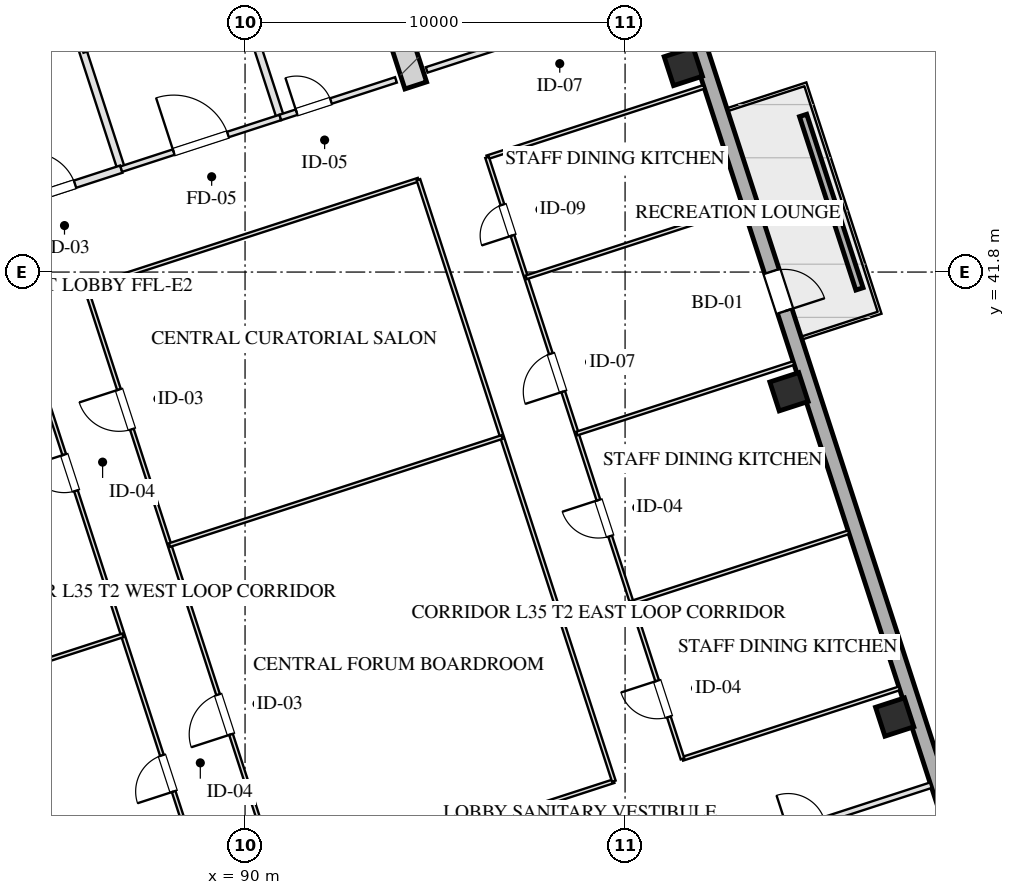
"""IFC4 building model, lengths in metres.
Left out: names, types, materials, properties, quantities, classifications, styles, units other than length and angle.
Written with IfcOpenShell. Run it as: python <this file> out.ifc"""

import sys

from ifc_helpers import new_model, si_unit, direction, frame, frame_2d, origin, origin_2d, place, context, subcontext, project, spatial, rectangle, hollow_rectangle, extrude, element, fill, save


model = new_model("IFC4")
c1 = context("Model", 3, precision=1e-05, world=origin(), true_north=direction((0.0, 1.0)))
c2 = subcontext(c1, "Body", "Model", "MODEL_VIEW")
j1 = project(units=[si_unit("LENGTHUNIT", "METRE"), si_unit("PLANEANGLEUNIT", "RADIAN")], contexts=[c1])
p1 = place(None, origin())
s1 = spatial("IfcSite", under=j1, at=p1, CompositionType="ELEMENT")
p2 = place(p1, origin())
s2 = spatial("IfcBuilding", under=s1, at=p2, CompositionType="ELEMENT")
p3 = place(p2, frame((0.0, 0.0, 134.55)))
s3 = spatial("IfcBuildingStorey", under=s2, at=p3, CompositionType="ELEMENT", Elevation=134.55)
p4 = place(p3, frame((94.492, 46.71, 0.0), z_axis=(0.0, 0.0, 1.0), x_axis=(-0.309010370028, 0.95105866865, 0.0)))
e1 = element("IfcWall", 1, at=p4, inside=s3, PredefinedType="SHEAR", context=c2, shape_type="SweptSolid", body=[
    extrude(rectangle(XDim=9.48, YDim=0.6, at=frame_2d((4.74, 0.0))), origin(), (0.0, 0.0, 1.0), 3.45),
])
for number, where, z_axis, x_axis in (
    (2, (107.094, 30.091, 0.0), (0.0, 0.0, 1.0), (0.951, 0.309, 0.0)),
    (3, (104.313, 38.651, 0.0), (0.0, 0.0, 1.0), (0.951, 0.309, 0.0)),
    (4, (101.532, 47.21, 0.0), (0.0, 0.0, 1.0), (0.951, 0.309, 0.0)),
):
    element("IfcColumn", number, at=place(p3, frame(where, z_axis=z_axis, x_axis=x_axis)), inside=s3, PredefinedType="COLUMN", context=c2, shape_type="SweptSolid", body=[
        extrude(hollow_rectangle(XDim=0.8, YDim=0.8, WallThickness=0.028, at=origin_2d()), origin(), (0.0, 0.0, 1.0), 3.451),
    ])
p5 = place(p3, frame((98.224, 59.173, 0.0), z_axis=(0.0, 0.0, 1.0), x_axis=(0.309014228706, -0.951057414911, 0.0)))
e5 = element("IfcWall", 5, at=p5, inside=s3, PredefinedType="SOLIDWALL", context=c2, shape_type="SweptSolid", body=[
    extrude(rectangle(XDim=42.8, YDim=0.4, at=frame_2d((21.4, 0.0))), origin(), (0.0, 0.0, 1.0), 2.55),
])
p6 = place(p5, frame((18.25, 0.0, 0.0)))
e6 = element("IfcOpeningElement", 6, at=p6, cuts=e5, PredefinedType="OPENING", context=c2, shape_type="SweptSolid", body=[
    extrude(rectangle(XDim=1.1, YDim=2.15, at=frame_2d((0.55, 1.075))), frame((0.0, 0.21, 0.0), z_axis=(0.0, -1.0, 0.0), x_axis=(1.0, 0.0, 0.0)), (0.0, 0.0, 1.0), 0.42),
])
p7 = place(p3, frame((106.168, 41.356, 0.0), z_axis=(0.0, 0.0, 1.0), x_axis=(-0.309032019345, 0.951051634255, 0.0)))
e7 = element("IfcWall", 7, at=p7, inside=s3, PredefinedType="PARAPET", context=c2, shape_type="SweptSolid", body=[
    extrude(rectangle(XDim=4.8, YDim=0.2, at=frame_2d((2.4, 0.0))), origin(), (0.0, 0.0, 1.0), 0.75),
])
p8 = place(p3, frame((86.743, 44.508, 0.0), z_axis=(0.0, 0.0, 1.0), x_axis=(-0.309016001439, 0.951056838919, 0.0)))
e8 = element("IfcWall", 8, at=p8, inside=s3, PredefinedType="PARTITIONING", context=c2, shape_type="SweptSolid", body=[
    extrude(rectangle(XDim=8.43, YDim=0.2, at=frame_2d((4.215, 0.0))), origin(), (0.0, 0.0, 1.0), 3.155),
])
p9 = place(p3, frame((83.101, 43.324, 0.0), z_axis=(0.0, 0.0, 1.0), x_axis=(0.951052804469, 0.309028417967, 0.0)))
e9 = element("IfcWall", 9, at=p9, inside=s3, PredefinedType="PARTITIONING", context=c2, shape_type="SweptSolid", body=[
    extrude(rectangle(XDim=3.83, YDim=0.2, at=frame_2d((1.915, 0.0))), origin(), (0.0, 0.0, 1.0), 3.155),
])
p10 = place(p9, frame((1.35, 0.0, 0.0)))
e10 = element("IfcOpeningElement", 10, at=p10, cuts=e9, PredefinedType="OPENING", context=c2, shape_type="SweptSolid", body=[
    extrude(rectangle(XDim=1.2, YDim=2.05, at=frame_2d((0.6, 1.025))), frame((0.0, 0.11, 0.0), z_axis=(0.0, -1.0, 0.0), x_axis=(1.0, 0.0, 0.0)), (0.0, 0.0, 1.0), 0.22),
])
p11 = place(p3, frame((90.928, 45.868, 0.0), z_axis=(0.0, 0.0, 1.0), x_axis=(-0.309042196757, 0.951048327176, 0.0)))
e11 = element("IfcWall", 11, at=p11, inside=s3, PredefinedType="PARTITIONING", context=c2, shape_type="SweptSolid", body=[
    extrude(rectangle(XDim=8.43, YDim=0.2, at=frame_2d((4.215, 0.0))), origin(), (0.0, 0.0, 1.0), 3.155),
])
p12 = place(p3, frame((86.743, 44.508, 0.0), z_axis=(0.0, 0.0, 1.0), x_axis=(0.951063829732, 0.308994485023, 0.0)))
e12 = element("IfcWall", 12, at=p12, inside=s3, PredefinedType="PARTITIONING", context=c2, shape_type="SweptSolid", body=[
    extrude(rectangle(XDim=4.4, YDim=0.15, at=frame_2d((2.2, 0.0))), origin(), (0.0, 0.0, 1.0), 3.155),
])
p13 = place(p12, frame((1.45, 0.0, 0.0)))
e13 = element("IfcOpeningElement", 13, at=p13, cuts=e12, PredefinedType="OPENING", context=c2, shape_type="SweptSolid", body=[
    extrude(rectangle(XDim=1.5, YDim=2.05, at=frame_2d((0.75, 1.025))), frame((0.0, 0.085, 0.0), z_axis=(0.0, -1.0, 0.0), x_axis=(1.0, 0.0, 0.0)), (0.0, 0.0, 1.0), 0.17),
])
p14 = place(p3, frame((85.718, 47.666, 0.0), z_axis=(0.0, 0.0, 1.0), x_axis=(0.951058531764, 0.30901079133, 0.0)))
e14 = element("IfcWall", 14, at=p14, inside=s3, PredefinedType="PARTITIONING", context=c2, shape_type="SweptSolid", body=[
    extrude(rectangle(XDim=4.4, YDim=0.2, at=frame_2d((2.2, 0.0))), origin(), (0.0, 0.0, 1.0), 3.155),
])
p15 = place(p14, frame((0.45, 0.0, 0.0)))
e15 = element("IfcOpeningElement", 15, at=p15, cuts=e14, PredefinedType="OPENING", context=c2, shape_type="SweptSolid", body=[
    extrude(rectangle(XDim=1.1, YDim=2.05, at=frame_2d((0.55, 1.025))), frame((0.0, 0.11, 0.0), z_axis=(0.0, -1.0, 0.0), x_axis=(1.0, 0.0, 0.0)), (0.0, 0.0, 1.0), 0.22),
])
p16 = place(p14, frame((2.55, 0.0, 0.0)))
e16 = element("IfcOpeningElement", 16, at=p16, cuts=e14, PredefinedType="OPENING", context=c2, shape_type="SweptSolid", body=[
    extrude(rectangle(XDim=1.1, YDim=2.05, at=frame_2d((0.55, 1.025))), frame((0.0, 0.11, 0.0), z_axis=(0.0, -1.0, 0.0), x_axis=(1.0, 0.0, 0.0)), (0.0, 0.0, 1.0), 0.22),
])
p17 = place(p3, frame((90.928, 45.868, 0.0), z_axis=(0.0, 0.0, 1.0), x_axis=(0.951059297078, 0.309008435874, 0.0)))
e17 = element("IfcWall", 17, at=p17, inside=s3, PredefinedType="PARTITIONING", context=c2, shape_type="SweptSolid", body=[
    extrude(rectangle(XDim=3.2, YDim=0.15, at=frame_2d((1.6, 0.0))), origin(), (0.0, 0.0, 1.0), 3.155),
])
p18 = place(p17, frame((0.45, 0.0, 0.0)))
e18 = element("IfcOpeningElement", 18, at=p18, cuts=e17, PredefinedType="OPENING", context=c2, shape_type="SweptSolid", body=[
    extrude(rectangle(XDim=0.95, YDim=2.05, at=frame_2d((0.475, 1.025))), frame((0.0, 0.085, 0.0), z_axis=(0.0, -1.0, 0.0), x_axis=(1.0, 0.0, 0.0)), (0.0, 0.0, 1.0), 0.17),
])
p19 = place(p3, frame((101.578, 26.196, 0.0), z_axis=(0.0, 0.0, 1.0), x_axis=(0.951064934653, 0.308991084134, 0.0)))
e19 = element("IfcWall", 19, at=p19, inside=s3, PredefinedType="PARTITIONING", context=c2, shape_type="SweptSolid", body=[
    extrude(rectangle(XDim=6.8, YDim=0.15, at=frame_2d((3.4, 0.0))), origin(), (0.0, 0.0, 1.0), 3.155),
])
p20 = place(p19, frame((2.856, 0.0, 0.0)))
e20 = element("IfcOpeningElement", 20, at=p20, cuts=e19, PredefinedType="OPENING", context=c2, shape_type="SweptSolid", body=[
    extrude(rectangle(XDim=1.0, YDim=2.05, at=frame_2d((0.5, 1.025))), frame((0.0, 0.085, 0.0), z_axis=(0.0, -1.0, 0.0), x_axis=(1.0, 0.0, 0.0)), (0.0, 0.0, 1.0), 0.17),
])
p21 = place(p3, frame((94.78, 47.119, 0.0), z_axis=(0.0, 0.0, 1.0), x_axis=(0.951057811516, 0.309013008068, 0.0)))
e21 = element("IfcWall", 21, at=p21, inside=s3, PredefinedType="PARTITIONING", context=c2, shape_type="SweptSolid", body=[
    extrude(rectangle(XDim=6.8, YDim=0.15, at=frame_2d((3.4, 0.0))), origin(), (0.0, 0.0, 1.0), 3.155),
])
p22 = place(p21, frame((2.856, 0.0, 0.0)))
e22 = element("IfcOpeningElement", 22, at=p22, cuts=e21, PredefinedType="OPENING", context=c2, shape_type="SweptSolid", body=[
    extrude(rectangle(XDim=1.05, YDim=2.05, at=frame_2d((0.525, 1.025))), frame((0.0, 0.085, 0.0), z_axis=(0.0, -1.0, 0.0), x_axis=(1.0, 0.0, 0.0)), (0.0, 0.0, 1.0), 0.17),
])
p23 = place(p3, frame((90.954, 25.562, 0.0), z_axis=(0.0, 0.0, 1.0), x_axis=(0.951052398814, 0.309029666393, 0.0)))
e23 = element("IfcWall", 23, at=p23, inside=s3, PredefinedType="MOVABLE", context=c2, shape_type="SweptSolid", body=[
    extrude(rectangle(XDim=9.2, YDim=0.1, at=frame_2d((4.6, 0.0))), origin(), (0.0, 0.0, 1.0), 3.155),
])
p24 = place(p3, frame((101.511, 28.992, 0.0), z_axis=(0.0, 0.0, 1.0), x_axis=(0.951048719763, 0.309040988602, 0.0)))
e24 = element("IfcWall", 24, at=p24, inside=s3, PredefinedType="MOVABLE", context=c2, shape_type="SweptSolid", body=[
    extrude(rectangle(XDim=6.0, YDim=0.1, at=frame_2d((3.0, 0.0))), origin(), (0.0, 0.0, 1.0), 3.155),
])
p25 = place(p3, frame((85.812, 41.387, 0.0), z_axis=(0.0, 0.0, 1.0), x_axis=(0.951054933035, 0.309021867106, 0.0)))
e25 = element("IfcWall", 25, at=p25, inside=s3, PredefinedType="MOVABLE", context=c2, shape_type="SweptSolid", body=[
    extrude(rectangle(XDim=9.2, YDim=0.1, at=frame_2d((4.6, 0.0))), origin(), (0.0, 0.0, 1.0), 3.155),
])
p26 = place(p3, frame((96.369, 44.818, 0.0), z_axis=(0.0, 0.0, 1.0), x_axis=(0.95106067854, 0.309004184009, 0.0)))
e26 = element("IfcWall", 26, at=p26, inside=s3, PredefinedType="MOVABLE", context=c2, shape_type="SweptSolid", body=[
    extrude(rectangle(XDim=6.0, YDim=0.1, at=frame_2d((3.0, 0.0))), origin(), (0.0, 0.0, 1.0), 3.155),
])
p27 = place(p3, frame((89.147, 24.975, 0.0), z_axis=(0.0, 0.0, 1.0), x_axis=(-0.309022042254, 0.951054876125, 0.0)))
e27 = element("IfcWall", 27, at=p27, inside=s3, PredefinedType="MOVABLE", context=c2, shape_type="SweptSolid", body=[
    extrude(rectangle(XDim=16.64, YDim=0.1, at=frame_2d((8.32, 0.0))), origin(), (0.0, 0.0, 1.0), 3.155),
])
p28 = place(p27, frame((3.32, 0.0, 0.0)))
e28 = element("IfcOpeningElement", 28, at=p28, cuts=e27, PredefinedType="OPENING", context=c2, shape_type="SweptSolid", body=[
    extrude(rectangle(XDim=1.0, YDim=2.05, at=frame_2d((0.5, 1.025))), frame((0.0, 0.06, 0.0), z_axis=(0.0, -1.0, 0.0), x_axis=(1.0, 0.0, 0.0)), (0.0, 0.0, 1.0), 0.12),
])
p29 = place(p27, frame((11.64, 0.0, 0.0)))
e29 = element("IfcOpeningElement", 29, at=p29, cuts=e27, PredefinedType="OPENING", context=c2, shape_type="SweptSolid", body=[
    extrude(rectangle(XDim=1.0, YDim=2.05, at=frame_2d((0.5, 1.025))), frame((0.0, 0.06, 0.0), z_axis=(0.0, -1.0, 0.0), x_axis=(1.0, 0.0, 0.0)), (0.0, 0.0, 1.0), 0.12),
])
p30 = place(p3, frame((90.954, 25.562, 0.0), z_axis=(0.0, 0.0, 1.0), x_axis=(-0.30901773025, 0.951056277195, 0.0)))
e30 = element("IfcWall", 30, at=p30, inside=s3, PredefinedType="MOVABLE", context=c2, shape_type="SweptSolid", body=[
    extrude(rectangle(XDim=16.64, YDim=0.1, at=frame_2d((8.32, 0.0))), origin(), (0.0, 0.0, 1.0), 3.155),
])
p31 = place(p30, frame((4.284, 0.0, 0.0)))
e31 = element("IfcOpeningElement", 31, at=p31, cuts=e30, PredefinedType="OPENING", context=c2, shape_type="SweptSolid", body=[
    extrude(rectangle(XDim=1.1, YDim=2.05, at=frame_2d((0.55, 1.025))), frame((0.0, 0.06, 0.0), z_axis=(0.0, -1.0, 0.0), x_axis=(1.0, 0.0, 0.0)), (0.0, 0.0, 1.0), 0.12),
])
p32 = place(p30, frame((12.724, 0.0, 0.0)))
e32 = element("IfcOpeningElement", 32, at=p32, cuts=e30, PredefinedType="OPENING", context=c2, shape_type="SweptSolid", body=[
    extrude(rectangle(XDim=1.1, YDim=2.05, at=frame_2d((0.55, 1.025))), frame((0.0, 0.06, 0.0), z_axis=(0.0, -1.0, 0.0), x_axis=(1.0, 0.0, 0.0)), (0.0, 0.0, 1.0), 0.12),
])
p33 = place(p3, frame((99.704, 28.405, 0.0), z_axis=(0.0, 0.0, 1.0), x_axis=(-0.309004459387, 0.951060589068, 0.0)))
e33 = element("IfcWall", 33, at=p33, inside=s3, PredefinedType="MOVABLE", context=c2, shape_type="SweptSolid", body=[
    extrude(rectangle(XDim=16.64, YDim=0.1, at=frame_2d((8.32, 0.0))), origin(), (0.0, 0.0, 1.0), 3.155),
])
p34 = place(p3, frame((101.511, 28.992, 0.0), z_axis=(0.0, 0.0, 1.0), x_axis=(-0.30901773025, 0.951056277195, 0.0)))
e34 = element("IfcWall", 34, at=p34, inside=s3, PredefinedType="MOVABLE", context=c2, shape_type="SweptSolid", body=[
    extrude(rectangle(XDim=16.64, YDim=0.1, at=frame_2d((8.32, 0.0))), origin(), (0.0, 0.0, 1.0), 3.155),
])
p35 = place(p34, frame((1.16, 0.0, 0.0)))
e35 = element("IfcOpeningElement", 35, at=p35, cuts=e34, PredefinedType="OPENING", context=c2, shape_type="SweptSolid", body=[
    extrude(rectangle(XDim=1.0, YDim=2.05, at=frame_2d((0.5, 1.025))), frame((0.0, 0.06, 0.0), z_axis=(0.0, -1.0, 0.0), x_axis=(1.0, 0.0, 0.0)), (0.0, 0.0, 1.0), 0.12),
])
p36 = place(p34, frame((6.16, 0.0, 0.0)))
e36 = element("IfcOpeningElement", 36, at=p36, cuts=e34, PredefinedType="OPENING", context=c2, shape_type="SweptSolid", body=[
    extrude(rectangle(XDim=1.0, YDim=2.05, at=frame_2d((0.5, 1.025))), frame((0.0, 0.06, 0.0), z_axis=(0.0, -1.0, 0.0), x_axis=(1.0, 0.0, 0.0)), (0.0, 0.0, 1.0), 0.12),
])
p37 = place(p34, frame((10.16, 0.0, 0.0)))
e37 = element("IfcOpeningElement", 37, at=p37, cuts=e34, PredefinedType="OPENING", context=c2, shape_type="SweptSolid", body=[
    extrude(rectangle(XDim=1.05, YDim=2.05, at=frame_2d((0.525, 1.025))), frame((0.0, 0.06, 0.0), z_axis=(0.0, -1.0, 0.0), x_axis=(1.0, 0.0, 0.0)), (0.0, 0.0, 1.0), 0.12),
])
p38 = place(p34, frame((14.48, 0.0, 0.0)))
e38 = element("IfcOpeningElement", 38, at=p38, cuts=e34, PredefinedType="OPENING", context=c2, shape_type="SweptSolid", body=[
    extrude(rectangle(XDim=0.85, YDim=2.05, at=frame_2d((0.425, 1.025))), frame((0.0, 0.06, 0.0), z_axis=(0.0, -1.0, 0.0), x_axis=(1.0, 0.0, 0.0)), (0.0, 0.0, 1.0), 0.12),
])
p39 = place(p3, frame((88.012, 34.616, 0.0), z_axis=(0.0, 0.0, 1.0), x_axis=(0.951054933035, 0.309021867106, 0.0)))
e39 = element("IfcWall", 39, at=p39, inside=s3, PredefinedType="MOVABLE", context=c2, shape_type="SweptSolid", body=[
    extrude(rectangle(XDim=9.2, YDim=0.1, at=frame_2d((4.6, 0.0))), origin(), (0.0, 0.0, 1.0), 3.155),
])
p40 = place(p3, frame((75.564, 28.594, 0.0), z_axis=(0.0, 0.0, 1.0), x_axis=(0.95106006537, 0.309006071232, 0.0)))
e40 = element("IfcWall", 40, at=p40, inside=s3, PredefinedType="MOVABLE", context=c2, shape_type="SweptSolid", body=[
    extrude(rectangle(XDim=11.8, YDim=0.1, at=frame_2d((5.9, 0.0))), origin(), (0.0, 0.0, 1.0), 3.155),
])
for number, where, z_axis, x_axis in (
    (41, (100.176, 33.101, 0.0), (0.0, 0.0, 1.0), (0.951, 0.309, 0.0)),
    (42, (98.73, 37.552, 0.0), (0.0, 0.0, 1.0), (0.951, 0.309, 0.0)),
    (43, (97.395, 41.66, 0.0), (0.0, 0.0, 1.0), (0.951, 0.309, 0.0)),
):
    element("IfcWall", number, at=place(p3, frame(where, z_axis=z_axis, x_axis=x_axis)), inside=s3, PredefinedType="MOVABLE", context=c2, shape_type="SweptSolid", body=[
        extrude(rectangle(XDim=6.0, YDim=0.1, at=frame_2d((3.0, 0.0))), origin(), (0.0, 0.0, 1.0), 3.155),
    ])
p41 = place(p6, origin())
e44 = element("IfcDoor", 44, at=p41, inside=s3, OperationType="SINGLE_SWING_RIGHT", PredefinedType="DOOR", context=c2, shape_type="SweptSolid", body=[
    extrude(rectangle(XDim=1.1, YDim=2.15, at=frame_2d((0.55, 1.075))), frame((0.0, 0.025, 0.0), z_axis=(0.0, -1.0, 0.0), x_axis=(1.0, 0.0, 0.0)), (0.0, 0.0, 1.0), 0.05),
])
fill(e6, e44)
p42 = place(p10, origin())
e45 = element("IfcDoor", 45, at=p42, inside=s3, OperationType="SINGLE_SWING_LEFT", PredefinedType="DOOR", context=c2, shape_type="SweptSolid", body=[
    extrude(rectangle(XDim=1.2, YDim=2.05, at=frame_2d((0.6, 1.025))), frame((0.0, 0.025, 0.0), z_axis=(0.0, -1.0, 0.0), x_axis=(1.0, 0.0, 0.0)), (0.0, 0.0, 1.0), 0.05),
])
fill(e10, e45)
p43 = place(p13, origin())
e46 = element("IfcDoor", 46, at=p43, inside=s3, OperationType="SINGLE_SWING_LEFT", PredefinedType="DOOR", context=c2, shape_type="SweptSolid", body=[
    extrude(rectangle(XDim=1.5, YDim=2.05, at=frame_2d((0.75, 1.025))), frame((0.0, 0.025, 0.0), z_axis=(0.0, -1.0, 0.0), x_axis=(1.0, 0.0, 0.0)), (0.0, 0.0, 1.0), 0.05),
])
fill(e13, e46)
p44 = place(p18, origin())
e47 = element("IfcDoor", 47, at=p44, inside=s3, OperationType="SINGLE_SWING_LEFT", PredefinedType="DOOR", context=c2, shape_type="SweptSolid", body=[
    extrude(rectangle(XDim=0.95, YDim=2.05, at=frame_2d((0.475, 1.025))), frame((0.0, 0.025, 0.0), z_axis=(0.0, -1.0, 0.0), x_axis=(1.0, 0.0, 0.0)), (0.0, 0.0, 1.0), 0.05),
])
fill(e18, e47)
p45 = place(p28, origin())
e48 = element("IfcDoor", 48, at=p45, inside=s3, OperationType="SINGLE_SWING_LEFT", PredefinedType="DOOR", context=c2, shape_type="SweptSolid", body=[
    extrude(rectangle(XDim=1.0, YDim=2.05, at=frame_2d((0.5, 1.025))), frame((0.0, 0.025, 0.0), z_axis=(0.0, -1.0, 0.0), x_axis=(1.0, 0.0, 0.0)), (0.0, 0.0, 1.0), 0.05),
])
fill(e28, e48)
p46 = place(p29, origin())
e49 = element("IfcDoor", 49, at=p46, inside=s3, OperationType="SINGLE_SWING_RIGHT", PredefinedType="DOOR", context=c2, shape_type="SweptSolid", body=[
    extrude(rectangle(XDim=1.0, YDim=2.05, at=frame_2d((0.5, 1.025))), frame((0.0, 0.025, 0.0), z_axis=(0.0, -1.0, 0.0), x_axis=(1.0, 0.0, 0.0)), (0.0, 0.0, 1.0), 0.05),
])
fill(e29, e49)
p47 = place(p31, origin())
e50 = element("IfcDoor", 50, at=p47, inside=s3, OperationType="SINGLE_SWING_LEFT", PredefinedType="DOOR", context=c2, shape_type="SweptSolid", body=[
    extrude(rectangle(XDim=1.1, YDim=2.05, at=frame_2d((0.55, 1.025))), frame((0.0, 0.025, 0.0), z_axis=(0.0, -1.0, 0.0), x_axis=(1.0, 0.0, 0.0)), (0.0, 0.0, 1.0), 0.05),
])
fill(e31, e50)
p48 = place(p32, origin())
e51 = element("IfcDoor", 51, at=p48, inside=s3, OperationType="SINGLE_SWING_RIGHT", PredefinedType="DOOR", context=c2, shape_type="SweptSolid", body=[
    extrude(rectangle(XDim=1.1, YDim=2.05, at=frame_2d((0.55, 1.025))), frame((0.0, 0.025, 0.0), z_axis=(0.0, -1.0, 0.0), x_axis=(1.0, 0.0, 0.0)), (0.0, 0.0, 1.0), 0.05),
])
fill(e32, e51)
p49 = place(p35, origin())
e52 = element("IfcDoor", 52, at=p49, inside=s3, OperationType="SINGLE_SWING_RIGHT", PredefinedType="DOOR", context=c2, shape_type="SweptSolid", body=[
    extrude(rectangle(XDim=1.0, YDim=2.05, at=frame_2d((0.5, 1.025))), frame((0.0, 0.025, 0.0), z_axis=(0.0, -1.0, 0.0), x_axis=(1.0, 0.0, 0.0)), (0.0, 0.0, 1.0), 0.05),
])
fill(e35, e52)
p50 = place(p36, origin())
e53 = element("IfcDoor", 53, at=p50, inside=s3, OperationType="SINGLE_SWING_RIGHT", PredefinedType="DOOR", context=c2, shape_type="SweptSolid", body=[
    extrude(rectangle(XDim=1.0, YDim=2.05, at=frame_2d((0.5, 1.025))), frame((0.0, 0.025, 0.0), z_axis=(0.0, -1.0, 0.0), x_axis=(1.0, 0.0, 0.0)), (0.0, 0.0, 1.0), 0.05),
])
fill(e36, e53)
p51 = place(p37, origin())
e54 = element("IfcDoor", 54, at=p51, inside=s3, OperationType="SINGLE_SWING_LEFT", PredefinedType="DOOR", context=c2, shape_type="SweptSolid", body=[
    extrude(rectangle(XDim=1.05, YDim=2.05, at=frame_2d((0.525, 1.025))), frame((0.0, 0.025, 0.0), z_axis=(0.0, -1.0, 0.0), x_axis=(1.0, 0.0, 0.0)), (0.0, 0.0, 1.0), 0.05),
])
fill(e37, e54)
p52 = place(p38, origin())
e55 = element("IfcDoor", 55, at=p52, inside=s3, OperationType="SINGLE_SWING_LEFT", PredefinedType="DOOR", context=c2, shape_type="SweptSolid", body=[
    extrude(rectangle(XDim=0.85, YDim=2.05, at=frame_2d((0.425, 1.025))), frame((0.0, 0.025, 0.0), z_axis=(0.0, -1.0, 0.0), x_axis=(1.0, 0.0, 0.0)), (0.0, 0.0, 1.0), 0.05),
])
fill(e38, e55)
save(model, sys.argv[1])
